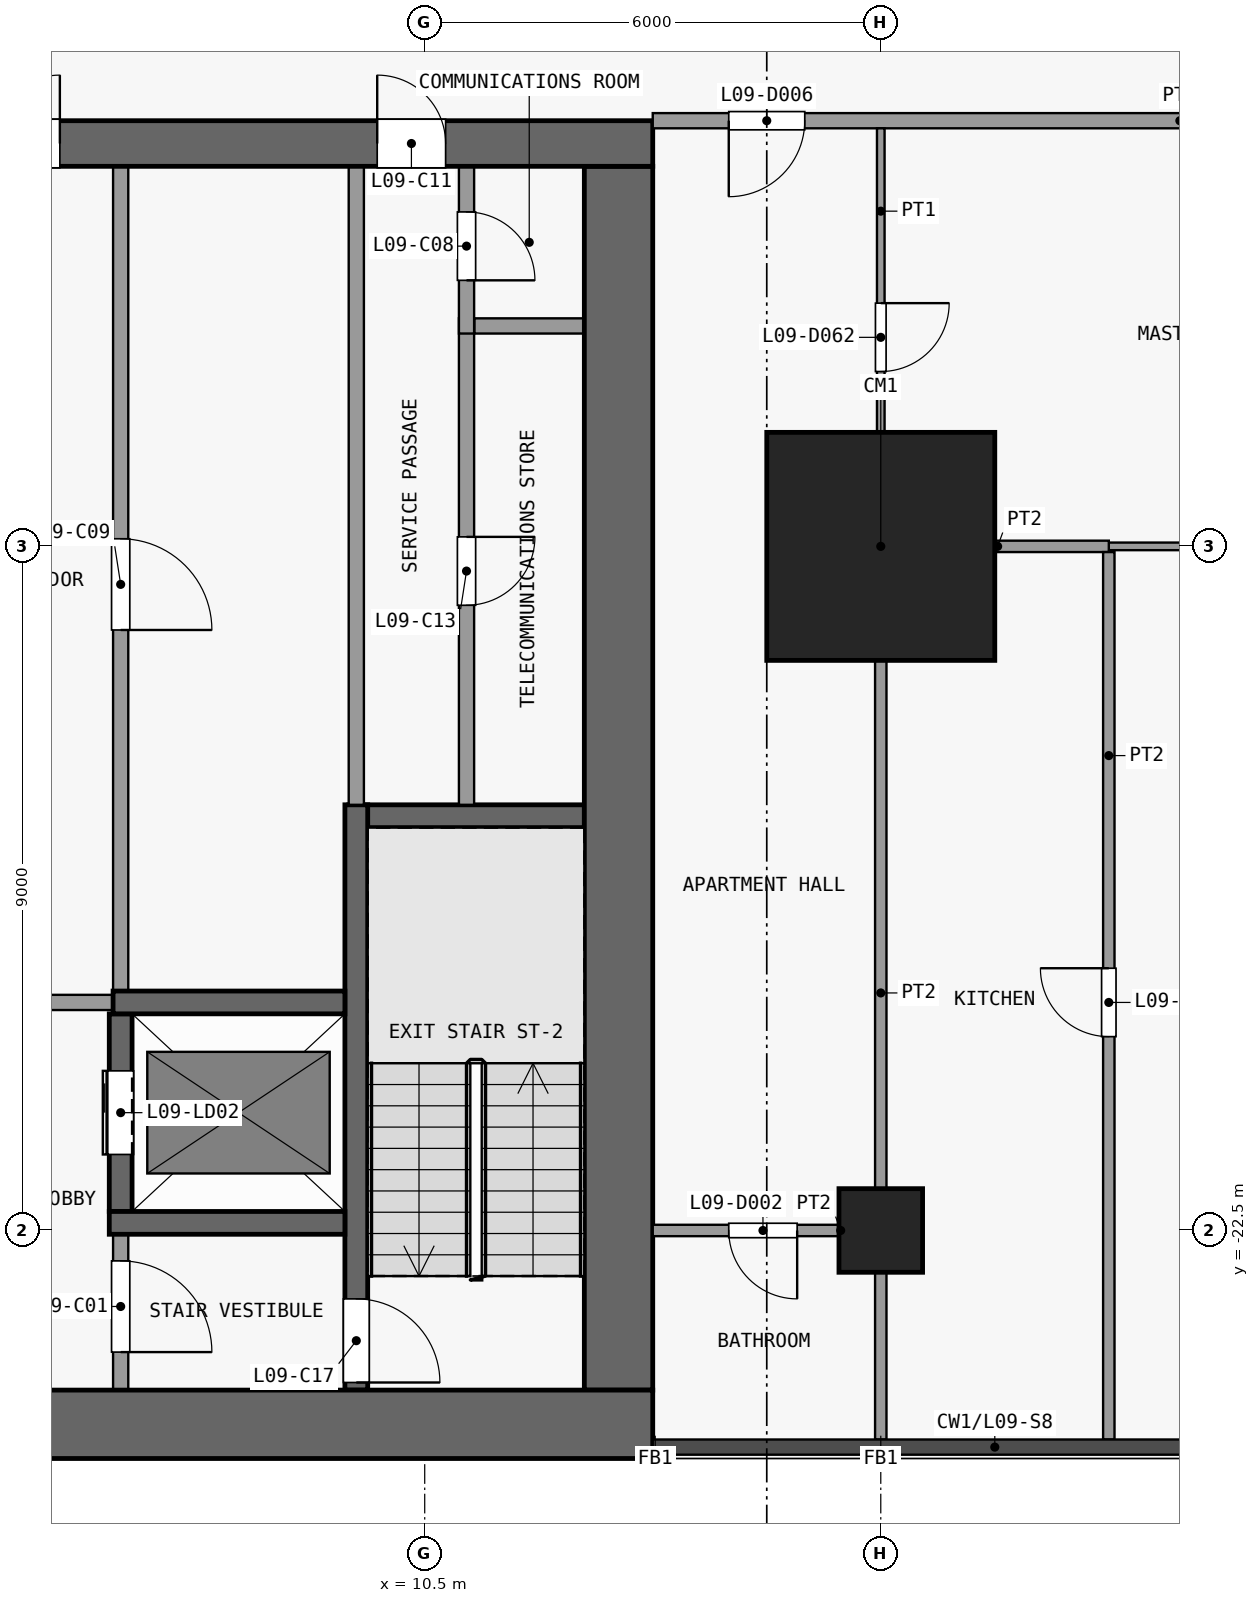
"""IFC4 building model, lengths in metres.
Left out: names, types, materials, properties, quantities, classifications, styles, units other than length and angle.
Written with IfcOpenShell. Run it as: python <this file> out.ifc"""

import sys

from ifc_helpers import new_model, si_unit, direction, frame, frame_2d, origin, origin_2d, place, context, subcontext, project, spatial, rectangle, extrude, element, fill, save


model = new_model("IFC4")
c1 = context("Model", 3, precision=1e-05, world=origin(), true_north=direction((0.0, 1.0)))
c2 = subcontext(c1, "Body", "Model", "MODEL_VIEW")
j1 = project(units=[si_unit("LENGTHUNIT", "METRE"), si_unit("PLANEANGLEUNIT", "RADIAN")], contexts=[c1])
p1 = place(None, origin())
s1 = spatial("IfcSite", under=j1, at=p1, CompositionType="ELEMENT")
p2 = place(p1, origin())
s2 = spatial("IfcBuilding", under=s1, at=p2, CompositionType="ELEMENT")
p3 = place(p2, frame((0.0, 0.0, 43.3)))
s3 = spatial("IfcBuildingStorey", under=s2, at=p3, CompositionType="ELEMENT", Elevation=43.3)
p4 = place(p3, frame((16.5, -22.5, 0.0), z_axis=(0.0, 0.0, 1.0), x_axis=(1.0, 0.0, 0.0)))
e1 = element("IfcColumn", 1, at=p4, inside=s3, PredefinedType="COLUMN", context=c2, shape_type="SweptSolid", body=[
    extrude(rectangle(XDim=1.1, YDim=1.1, at=origin_2d()), origin(), (0.0, 0.0, 1.0), 3.6),
])
p5 = place(p3, frame((16.5, -13.5, 0.0), z_axis=(0.0, 0.0, 1.0), x_axis=(1.0, 0.0, 0.0)))
e2 = element("IfcColumn", 2, at=p5, inside=s3, PredefinedType="COLUMN", context=c2, shape_type="SweptSolid", body=[
    extrude(rectangle(XDim=3.0, YDim=3.0, at=origin_2d()), origin(), (0.0, 0.0, 1.0), 3.6),
])
p6 = place(p3, frame((-13.5, -25.05, 0.0), z_axis=(0.0, 0.0, 1.0), x_axis=(1.0, 0.0, 0.0)))
e3 = element("IfcWall", 3, at=p6, inside=s3, PredefinedType="SHEAR", context=c2, shape_type="SweptSolid", body=[
    extrude(rectangle(XDim=27.0, YDim=0.9, at=frame_2d((13.5, 0.0))), origin(), (0.0, 0.0, 1.0), 3.3),
])
p7 = place(p3, frame((-13.5, -8.2, 0.0), z_axis=(0.0, 0.0, 1.0), x_axis=(1.0, 0.0, 0.0)))
e4 = element("IfcWall", 4, at=p7, inside=s3, PredefinedType="SHEAR", context=c2, shape_type="SweptSolid", body=[
    extrude(rectangle(XDim=27.0, YDim=0.6, at=frame_2d((13.5, 0.0))), origin(), (0.0, 0.0, 1.0), 3.3),
])
p8 = place(p7, frame((7.8, 0.0, 0.0)))
e5 = element("IfcOpeningElement", 5, at=p8, cuts=e4, PredefinedType="OPENING", context=c2, shape_type="SweptSolid", body=[
    extrude(rectangle(XDim=1.8, YDim=2.1, at=frame_2d((0.9, 1.05))), frame((0.0, 0.31, 0.0), z_axis=(0.0, -1.0, 0.0), x_axis=(1.0, 0.0, 0.0)), (0.0, 0.0, 1.0), 0.62),
])
p9 = place(p7, frame((17.4, 0.0, 0.0)))
e6 = element("IfcOpeningElement", 6, at=p9, cuts=e4, PredefinedType="OPENING", context=c2, shape_type="SweptSolid", body=[
    extrude(rectangle(XDim=1.8, YDim=2.1, at=frame_2d((0.9, 1.05))), frame((0.0, 0.31, 0.0), z_axis=(0.0, -1.0, 0.0), x_axis=(1.0, 0.0, 0.0)), (0.0, 0.0, 1.0), 0.62),
])
p10 = place(p7, frame((2.725, 0.0, 0.0)))
e7 = element("IfcOpeningElement", 7, at=p10, cuts=e4, PredefinedType="OPENING", context=c2, shape_type="SweptSolid", body=[
    extrude(rectangle(XDim=0.9, YDim=2.1, at=frame_2d((0.45, 1.05))), frame((0.0, 0.31, 0.0), z_axis=(0.0, -1.0, 0.0), x_axis=(1.0, 0.0, 0.0)), (0.0, 0.0, 1.0), 0.62),
])
p11 = place(p7, frame((23.375, 0.0, 0.0)))
e8 = element("IfcOpeningElement", 8, at=p11, cuts=e4, PredefinedType="OPENING", context=c2, shape_type="SweptSolid", body=[
    extrude(rectangle(XDim=0.9, YDim=2.1, at=frame_2d((0.45, 1.05))), frame((0.0, 0.31, 0.0), z_axis=(0.0, -1.0, 0.0), x_axis=(1.0, 0.0, 0.0)), (0.0, 0.0, 1.0), 0.62),
])
p12 = place(p3, frame((13.05, -24.6, 0.0), z_axis=(0.0, 0.0, 1.0), x_axis=(0.0, 1.0, 0.0)))
e9 = element("IfcWall", 9, at=p12, inside=s3, PredefinedType="SHEAR", context=c2, shape_type="SweptSolid", body=[
    extrude(rectangle(XDim=16.1, YDim=0.9, at=frame_2d((8.05, 0.0))), origin(), (0.0, 0.0, 1.0), 3.3),
])
p13 = place(p3, frame((6.35, -22.4, 0.0), z_axis=(0.0, 0.0, 1.0), x_axis=(1.0, 0.0, 0.0)))
e10 = element("IfcWall", 10, at=p13, inside=s3, PredefinedType="SHEAR", context=c2, shape_type="SweptSolid", body=[
    extrude(rectangle(XDim=3.1, YDim=0.3, at=frame_2d((1.55, 0.0))), origin(), (0.0, 0.0, 1.0), 3.3),
])
p14 = place(p3, frame((6.4, -19.5, 0.0), z_axis=(0.0, 0.0, 1.0), x_axis=(-1.0, 0.0, 0.0)))
e11 = element("IfcWall", 11, at=p14, inside=s3, PredefinedType="PARTITIONING", context=c2, shape_type="SweptSolid", body=[
    extrude(rectangle(XDim=3.375, YDim=0.2, at=frame_2d((1.688, 0.0))), origin(), (0.0, 0.0, 1.0), 3.3),
])
p15 = place(p14, frame((0.85, 0.0, 0.0)))
e12 = element("IfcOpeningElement", 12, at=p15, cuts=e11, PredefinedType="OPENING", context=c2, shape_type="SweptSolid", body=[
    extrude(rectangle(XDim=1.5, YDim=2.1, at=frame_2d((0.75, 1.05))), frame((0.0, 0.11, 0.0), z_axis=(0.0, -1.0, 0.0), x_axis=(1.0, 0.0, 0.0)), (0.0, 0.0, 1.0), 0.22),
])
p16 = place(p3, frame((6.4, -19.5, 0.0), z_axis=(0.0, 0.0, 1.0), x_axis=(1.0, 0.0, 0.0)))
e13 = element("IfcWall", 13, at=p16, inside=s3, PredefinedType="SHEAR", context=c2, shape_type="SweptSolid", body=[
    extrude(rectangle(XDim=3.05, YDim=0.3, at=frame_2d((1.525, 0.0))), origin(), (0.0, 0.0, 1.0), 3.3),
])
p17 = place(p3, frame((9.5, -17.05, 0.0), z_axis=(0.0, 0.0, 1.0), x_axis=(1.0, 0.0, 0.0)))
e14 = element("IfcWall", 14, at=p17, inside=s3, PredefinedType="SHEAR", context=c2, shape_type="SweptSolid", body=[
    extrude(rectangle(XDim=3.1, YDim=0.3, at=frame_2d((1.55, 0.0))), origin(), (0.0, 0.0, 1.0), 3.3),
])
p18 = place(p3, frame((11.15, -10.6, 0.0), z_axis=(0.0, 0.0, 1.0), x_axis=(1.0, 0.0, 0.0)))
e15 = element("IfcWall", 15, at=p18, inside=s3, PredefinedType="PARTITIONING", context=c2, shape_type="SweptSolid", body=[
    extrude(rectangle(XDim=1.45, YDim=0.2, at=frame_2d((0.725, 0.0))), origin(), (0.0, 0.0, 1.0), 3.3),
])
p19 = place(p3, frame((6.5, -22.55, 0.0), z_axis=(0.0, 0.0, 1.0), x_axis=(0.0, -1.0, 0.0)))
e16 = element("IfcWall", 16, at=p19, inside=s3, PredefinedType="PARTITIONING", context=c2, shape_type="SweptSolid", body=[
    extrude(rectangle(XDim=2.05, YDim=0.2, at=frame_2d((1.025, 0.0))), origin(), (0.0, 0.0, 1.0), 3.3),
])
p20 = place(p19, frame((0.35, 0.0, 0.0)))
e17 = element("IfcOpeningElement", 17, at=p20, cuts=e16, PredefinedType="OPENING", context=c2, shape_type="SweptSolid", body=[
    extrude(rectangle(XDim=1.2, YDim=2.1, at=frame_2d((0.6, 1.05))), frame((0.0, 0.11, 0.0), z_axis=(0.0, -1.0, 0.0), x_axis=(1.0, 0.0, 0.0)), (0.0, 0.0, 1.0), 0.22),
])
p21 = place(p3, frame((6.5, -22.25, 0.0), z_axis=(0.0, 0.0, 1.0), x_axis=(0.0, 1.0, 0.0)))
e18 = element("IfcWall", 18, at=p21, inside=s3, PredefinedType="SHEAR", context=c2, shape_type="SweptSolid", body=[
    extrude(rectangle(XDim=2.6, YDim=0.3, at=frame_2d((1.3, 0.0))), origin(), (0.0, 0.0, 1.0), 3.3),
])
p22 = place(p21, frame((0.75, 0.0, 0.0)))
e19 = element("IfcOpeningElement", 19, at=p22, cuts=e18, PredefinedType="OPENING", context=c2, shape_type="SweptSolid", body=[
    extrude(rectangle(XDim=1.1, YDim=2.1, at=frame_2d((0.55, 1.05))), frame((0.0, 0.16, 0.0), z_axis=(0.0, -1.0, 0.0), x_axis=(1.0, 0.0, 0.0)), (0.0, 0.0, 1.0), 0.32),
])
p23 = place(p3, frame((6.5, -8.5, 0.0), z_axis=(0.0, 0.0, 1.0), x_axis=(0.0, -1.0, 0.0)))
e20 = element("IfcWall", 20, at=p23, inside=s3, PredefinedType="PARTITIONING", context=c2, shape_type="SweptSolid", body=[
    extrude(rectangle(XDim=10.85, YDim=0.2, at=frame_2d((5.425, 0.0))), origin(), (0.0, 0.0, 1.0), 3.3),
])
p24 = place(p23, frame((4.9, 0.0, 0.0)))
e21 = element("IfcOpeningElement", 21, at=p24, cuts=e20, PredefinedType="OPENING", context=c2, shape_type="SweptSolid", body=[
    extrude(rectangle(XDim=1.2, YDim=2.1, at=frame_2d((0.6, 1.05))), frame((0.0, 0.11, 0.0), z_axis=(0.0, -1.0, 0.0), x_axis=(1.0, 0.0, 0.0)), (0.0, 0.0, 1.0), 0.22),
])
p25 = place(p3, frame((9.6, -16.9, 0.0), z_axis=(0.0, 0.0, 1.0), x_axis=(0.0, -1.0, 0.0)))
e22 = element("IfcWall", 22, at=p25, inside=s3, PredefinedType="SHEAR", context=c2, shape_type="SweptSolid", body=[
    extrude(rectangle(XDim=7.7, YDim=0.3, at=frame_2d((3.85, 0.0))), origin(), (0.0, 0.0, 1.0), 3.3),
])
p26 = place(p25, frame((6.5, 0.0, 0.0)))
e23 = element("IfcOpeningElement", 23, at=p26, cuts=e22, PredefinedType="OPENING", context=c2, shape_type="SweptSolid", body=[
    extrude(rectangle(XDim=1.1, YDim=2.1, at=frame_2d((0.55, 1.05))), frame((0.0, 0.16, 0.0), z_axis=(0.0, -1.0, 0.0), x_axis=(1.0, 0.0, 0.0)), (0.0, 0.0, 1.0), 0.32),
])
p27 = place(p3, frame((9.6, -16.9, 0.0), z_axis=(0.0, 0.0, 1.0), x_axis=(0.0, 1.0, 0.0)))
e24 = element("IfcWall", 24, at=p27, inside=s3, PredefinedType="PARTITIONING", context=c2, shape_type="SweptSolid", body=[
    extrude(rectangle(XDim=8.4, YDim=0.2, at=frame_2d((4.2, 0.0))), origin(), (0.0, 0.0, 1.0), 3.3),
])
p28 = place(p3, frame((11.05, -10.5, 0.0), z_axis=(0.0, 0.0, 1.0), x_axis=(0.0, -1.0, 0.0)))
e25 = element("IfcWall", 25, at=p28, inside=s3, PredefinedType="PARTITIONING", context=c2, shape_type="SweptSolid", body=[
    extrude(rectangle(XDim=6.4, YDim=0.2, at=frame_2d((3.2, 0.0))), origin(), (0.0, 0.0, 1.0), 3.3),
])
p29 = place(p28, frame((2.875, 0.0, 0.0)))
e26 = element("IfcOpeningElement", 26, at=p29, cuts=e25, PredefinedType="OPENING", context=c2, shape_type="SweptSolid", body=[
    extrude(rectangle(XDim=0.9, YDim=2.1, at=frame_2d((0.45, 1.05))), frame((0.0, 0.11, 0.0), z_axis=(0.0, -1.0, 0.0), x_axis=(1.0, 0.0, 0.0)), (0.0, 0.0, 1.0), 0.22),
])
p30 = place(p3, frame((11.05, -8.5, 0.0), z_axis=(0.0, 0.0, 1.0), x_axis=(0.0, -1.0, 0.0)))
e27 = element("IfcWall", 27, at=p30, inside=s3, PredefinedType="PARTITIONING", context=c2, shape_type="SweptSolid", body=[
    extrude(rectangle(XDim=2.2, YDim=0.2, at=frame_2d((1.1, 0.0))), origin(), (0.0, 0.0, 1.0), 3.3),
])
p31 = place(p30, frame((0.6, 0.0, 0.0)))
e28 = element("IfcOpeningElement", 28, at=p31, cuts=e27, PredefinedType="OPENING", context=c2, shape_type="SweptSolid", body=[
    extrude(rectangle(XDim=0.9, YDim=2.1, at=frame_2d((0.45, 1.05))), frame((0.0, 0.11, 0.0), z_axis=(0.0, -1.0, 0.0), x_axis=(1.0, 0.0, 0.0)), (0.0, 0.0, 1.0), 0.22),
])
p32 = place(p3, frame((13.5, -22.5, 0.0), z_axis=(0.0, 0.0, 1.0), x_axis=(1.0, 0.0, 0.0)))
e29 = element("IfcWall", 29, at=p32, inside=s3, PredefinedType="PARTITIONING", context=c2, shape_type="SweptSolid", body=[
    extrude(rectangle(XDim=2.925, YDim=0.15, at=frame_2d((1.462, 0.0))), origin(), (0.0, 0.0, 1.0), 3.3),
])
p33 = place(p32, frame((1.0, 0.0, 0.0)))
e30 = element("IfcOpeningElement", 30, at=p33, cuts=e29, PredefinedType="OPENING", context=c2, shape_type="SweptSolid", body=[
    extrude(rectangle(XDim=0.9, YDim=2.1, at=frame_2d((0.45, 1.05))), frame((0.0, 0.085, 0.0), z_axis=(0.0, -1.0, 0.0), x_axis=(1.0, 0.0, 0.0)), (0.0, 0.0, 1.0), 0.17),
])
p34 = place(p3, frame((19.5, -13.5, 0.0), z_axis=(0.0, 0.0, 1.0), x_axis=(1.0, 0.0, 0.0)))
e31 = element("IfcWall", 31, at=p34, inside=s3, PredefinedType="PARTITIONING", context=c2, shape_type="SweptSolid", body=[
    extrude(rectangle(XDim=5.75, YDim=0.1, at=frame_2d((2.875, 0.0))), origin(), (0.0, 0.0, 1.0), 3.3),
])
p35 = place(p34, frame((1.4, 0.0, 0.0)))
e32 = element("IfcOpeningElement", 32, at=p35, cuts=e31, PredefinedType="OPENING", context=c2, shape_type="SweptSolid", body=[
    extrude(rectangle(XDim=0.9, YDim=2.1, at=frame_2d((0.45, 1.05))), frame((0.0, 0.06, 0.0), z_axis=(0.0, -1.0, 0.0), x_axis=(1.0, 0.0, 0.0)), (0.0, 0.0, 1.0), 0.12),
])
p36 = place(p3, frame((16.575, -13.5, 0.0), z_axis=(0.0, 0.0, 1.0), x_axis=(1.0, 0.0, 0.0)))
e33 = element("IfcWall", 33, at=p36, inside=s3, PredefinedType="PARTITIONING", context=c2, shape_type="SweptSolid", body=[
    extrude(rectangle(XDim=2.925, YDim=0.15, at=frame_2d((1.462, 0.0))), origin(), (0.0, 0.0, 1.0), 3.3),
])
p37 = place(p3, frame((13.5, -7.9, 0.0), z_axis=(0.0, 0.0, 1.0), x_axis=(1.0, 0.0, 0.0)))
e34 = element("IfcWall", 34, at=p37, inside=s3, PredefinedType="PARTITIONING", context=c2, shape_type="SweptSolid", body=[
    extrude(rectangle(XDim=11.75, YDim=0.2, at=frame_2d((5.875, 0.0))), origin(), (0.0, 0.0, 1.0), 3.3),
])
p38 = place(p37, frame((1.0, 0.0, 0.0)))
e35 = element("IfcOpeningElement", 35, at=p38, cuts=e34, PredefinedType="OPENING", context=c2, shape_type="SweptSolid", body=[
    extrude(rectangle(XDim=1.0, YDim=2.1, at=frame_2d((0.5, 1.05))), frame((0.0, 0.11, 0.0), z_axis=(0.0, -1.0, 0.0), x_axis=(1.0, 0.0, 0.0)), (0.0, 0.0, 1.0), 0.22),
])
p39 = place(p3, frame((16.5, -13.5, 0.0), z_axis=(0.0, 0.0, 1.0), x_axis=(0.0, 1.0, 0.0)))
e36 = element("IfcWall", 36, at=p39, inside=s3, PredefinedType="PARTITIONING", context=c2, shape_type="SweptSolid", body=[
    extrude(rectangle(XDim=5.5, YDim=0.1, at=frame_2d((2.75, 0.0))), origin(), (0.0, 0.0, 1.0), 3.3),
])
p40 = place(p39, frame((2.3, 0.0, 0.0)))
e37 = element("IfcOpeningElement", 37, at=p40, cuts=e36, PredefinedType="OPENING", context=c2, shape_type="SweptSolid", body=[
    extrude(rectangle(XDim=0.9, YDim=2.1, at=frame_2d((0.45, 1.05))), frame((0.0, 0.06, 0.0), z_axis=(0.0, -1.0, 0.0), x_axis=(1.0, 0.0, 0.0)), (0.0, 0.0, 1.0), 0.12),
])
p41 = place(p3, frame((16.5, -25.25, 0.0), z_axis=(0.0, 0.0, 1.0), x_axis=(0.0, 1.0, 0.0)))
e38 = element("IfcWall", 38, at=p41, inside=s3, PredefinedType="PARTITIONING", context=c2, shape_type="SweptSolid", body=[
    extrude(rectangle(XDim=11.75, YDim=0.15, at=frame_2d((5.875, 0.0))), origin(), (0.0, 0.0, 1.0), 3.3),
])
p42 = place(p3, frame((19.5, -25.25, 0.0), z_axis=(0.0, 0.0, 1.0), x_axis=(0.0, 1.0, 0.0)))
e39 = element("IfcWall", 39, at=p42, inside=s3, PredefinedType="PARTITIONING", context=c2, shape_type="SweptSolid", body=[
    extrude(rectangle(XDim=11.675, YDim=0.15, at=frame_2d((5.837, 0.0))), origin(), (0.0, 0.0, 1.0), 3.3),
])
p43 = place(p42, frame((5.3, 0.0, 0.0)))
e40 = element("IfcOpeningElement", 40, at=p43, cuts=e39, PredefinedType="OPENING", context=c2, shape_type="SweptSolid", body=[
    extrude(rectangle(XDim=0.9, YDim=2.1, at=frame_2d((0.45, 1.05))), frame((0.0, 0.085, 0.0), z_axis=(0.0, -1.0, 0.0), x_axis=(1.0, 0.0, 0.0)), (0.0, 0.0, 1.0), 0.17),
])
p44 = place(p22, origin())
e41 = element("IfcDoor", 41, at=p44, inside=s3, OperationType="DOUBLE_DOOR_SLIDING", PredefinedType="DOOR", context=c2, shape_type="SweptSolid", body=[
    extrude(rectangle(XDim=1.1, YDim=2.1, at=frame_2d((0.55, 1.05))), frame((0.0, 0.025, 0.0), z_axis=(0.0, -1.0, 0.0), x_axis=(1.0, 0.0, 0.0)), (0.0, 0.0, 1.0), 0.05),
])
fill(e19, e41)
p45 = place(p20, origin())
e42 = element("IfcDoor", 42, at=p45, inside=s3, OperationType="SINGLE_SWING_RIGHT", PredefinedType="DOOR", context=c2, shape_type="SweptSolid", body=[
    extrude(rectangle(XDim=1.2, YDim=2.1, at=frame_2d((0.6, 1.05))), frame((0.0, 0.025, 0.0), z_axis=(0.0, -1.0, 0.0), x_axis=(1.0, 0.0, 0.0)), (0.0, 0.0, 1.0), 0.05),
])
fill(e17, e42)
p46 = place(p9, origin())
e43 = element("IfcDoor", 43, at=p46, inside=s3, OperationType="DOUBLE_DOOR_SINGLE_SWING", PredefinedType="DOOR", context=c2, shape_type="SweptSolid", body=[
    extrude(rectangle(XDim=1.8, YDim=2.1, at=frame_2d((0.9, 1.05))), frame((0.0, 0.025, 0.0), z_axis=(0.0, -1.0, 0.0), x_axis=(1.0, 0.0, 0.0)), (0.0, 0.0, 1.0), 0.05),
])
fill(e6, e43)
p47 = place(p31, origin())
e44 = element("IfcDoor", 44, at=p47, inside=s3, OperationType="SINGLE_SWING_RIGHT", PredefinedType="DOOR", context=c2, shape_type="SweptSolid", body=[
    extrude(rectangle(XDim=0.9, YDim=2.1, at=frame_2d((0.45, 1.05))), frame((0.0, 0.025, 0.0), z_axis=(0.0, -1.0, 0.0), x_axis=(1.0, 0.0, 0.0)), (0.0, 0.0, 1.0), 0.05),
])
fill(e28, e44)
p48 = place(p24, origin())
e45 = element("IfcDoor", 45, at=p48, inside=s3, OperationType="SINGLE_SWING_RIGHT", PredefinedType="DOOR", context=c2, shape_type="SweptSolid", body=[
    extrude(rectangle(XDim=1.2, YDim=2.1, at=frame_2d((0.6, 1.05))), frame((0.0, 0.025, 0.0), z_axis=(0.0, -1.0, 0.0), x_axis=(1.0, 0.0, 0.0)), (0.0, 0.0, 1.0), 0.05),
])
fill(e21, e45)
p49 = place(p11, origin())
e46 = element("IfcDoor", 46, at=p49, inside=s3, OperationType="SINGLE_SWING_LEFT", PredefinedType="DOOR", context=c2, shape_type="SweptSolid", body=[
    extrude(rectangle(XDim=0.9, YDim=2.1, at=frame_2d((0.45, 1.05))), frame((0.0, 0.025, 0.0), z_axis=(0.0, -1.0, 0.0), x_axis=(1.0, 0.0, 0.0)), (0.0, 0.0, 1.0), 0.05),
])
fill(e8, e46)
p50 = place(p29, origin())
e47 = element("IfcDoor", 47, at=p50, inside=s3, OperationType="SINGLE_SWING_LEFT", PredefinedType="DOOR", context=c2, shape_type="SweptSolid", body=[
    extrude(rectangle(XDim=0.9, YDim=2.1, at=frame_2d((0.45, 1.05))), frame((0.0, 0.025, 0.0), z_axis=(0.0, -1.0, 0.0), x_axis=(1.0, 0.0, 0.0)), (0.0, 0.0, 1.0), 0.05),
])
fill(e26, e47)
p51 = place(p26, origin())
e48 = element("IfcDoor", 48, at=p51, inside=s3, OperationType="SINGLE_SWING_RIGHT", PredefinedType="DOOR", context=c2, shape_type="SweptSolid", body=[
    extrude(rectangle(XDim=1.1, YDim=2.1, at=frame_2d((0.55, 1.05))), frame((0.0, 0.025, 0.0), z_axis=(0.0, -1.0, 0.0), x_axis=(1.0, 0.0, 0.0)), (0.0, 0.0, 1.0), 0.05),
])
fill(e23, e48)
p52 = place(p33, origin())
e49 = element("IfcDoor", 49, at=p52, inside=s3, OperationType="SINGLE_SWING_RIGHT", PredefinedType="DOOR", context=c2, shape_type="SweptSolid", body=[
    extrude(rectangle(XDim=0.9, YDim=2.1, at=frame_2d((0.45, 1.05))), frame((0.0, 0.025, 0.0), z_axis=(0.0, -1.0, 0.0), x_axis=(1.0, 0.0, 0.0)), (0.0, 0.0, 1.0), 0.05),
])
fill(e30, e49)
p53 = place(p38, origin())
e50 = element("IfcDoor", 50, at=p53, inside=s3, OperationType="SINGLE_SWING_LEFT", PredefinedType="DOOR", context=c2, shape_type="SweptSolid", body=[
    extrude(rectangle(XDim=1.0, YDim=2.1, at=frame_2d((0.5, 1.05))), frame((0.0, 0.025, 0.0), z_axis=(0.0, -1.0, 0.0), x_axis=(1.0, 0.0, 0.0)), (0.0, 0.0, 1.0), 0.05),
])
fill(e35, e50)
p54 = place(p40, origin())
e51 = element("IfcDoor", 51, at=p54, inside=s3, OperationType="SINGLE_SWING_RIGHT", PredefinedType="DOOR", context=c2, shape_type="SweptSolid", body=[
    extrude(rectangle(XDim=0.9, YDim=2.1, at=frame_2d((0.45, 1.05))), frame((0.0, 0.025, 0.0), z_axis=(0.0, -1.0, 0.0), x_axis=(1.0, 0.0, 0.0)), (0.0, 0.0, 1.0), 0.05),
])
fill(e37, e51)
p55 = place(p43, origin())
e52 = element("IfcDoor", 52, at=p55, inside=s3, OperationType="SINGLE_SWING_LEFT", PredefinedType="DOOR", context=c2, shape_type="SweptSolid", body=[
    extrude(rectangle(XDim=0.9, YDim=2.1, at=frame_2d((0.45, 1.05))), frame((0.0, 0.025, 0.0), z_axis=(0.0, -1.0, 0.0), x_axis=(1.0, 0.0, 0.0)), (0.0, 0.0, 1.0), 0.05),
])
fill(e40, e52)
save(model, sys.argv[1])
